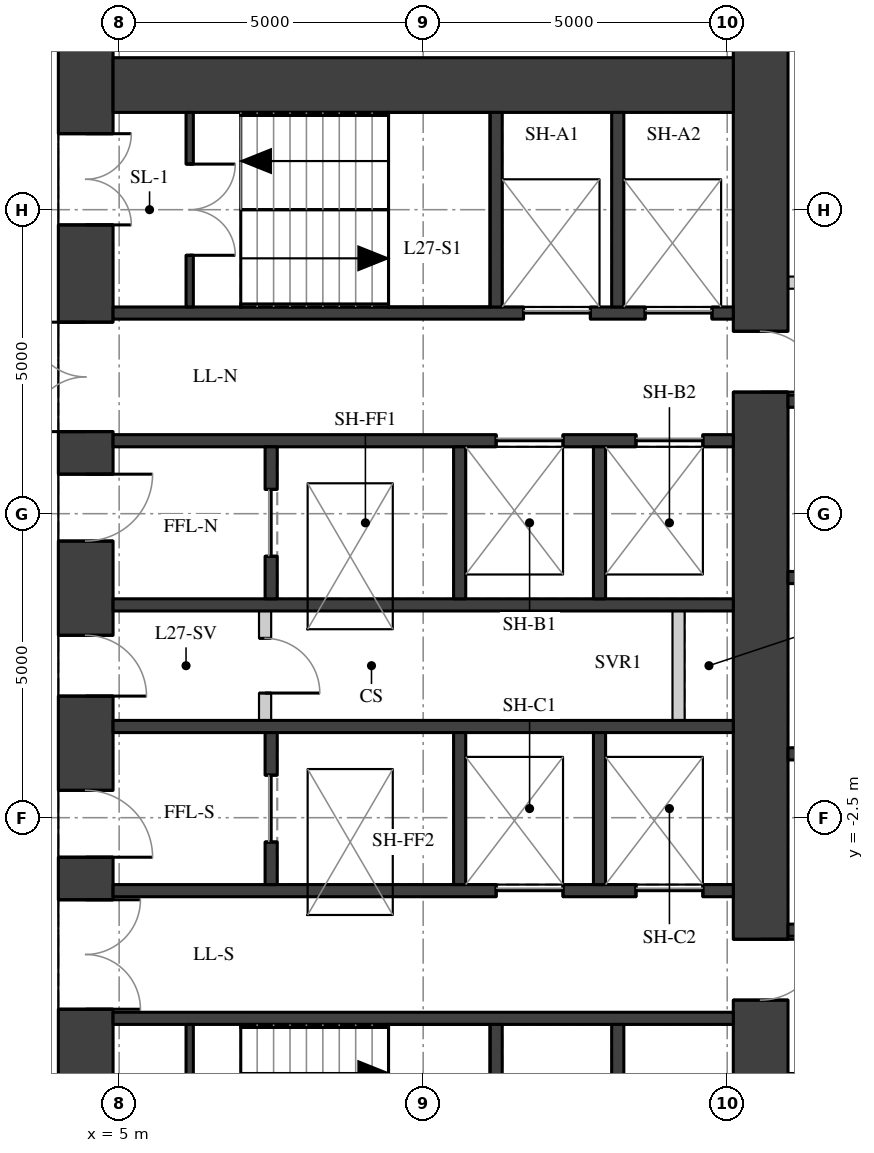
"""IFC4 building model, lengths in metres.
Left out: names, types, materials, properties, quantities, classifications, styles, units other than length and angle.
Written with IfcOpenShell. Run it as: python <this file> out.ifc"""

import sys

from ifc_helpers import new_model, si_unit, direction, frame, frame_2d, origin, place, context, subcontext, project, spatial, rectangle, extrude, element, fill, save


model = new_model("IFC4")
c1 = context("Model", 3, precision=1e-05, world=origin(), true_north=direction((0.0, 1.0)))
c2 = subcontext(c1, "Body", "Model", "MODEL_VIEW")
j1 = project(units=[si_unit("LENGTHUNIT", "METRE"), si_unit("PLANEANGLEUNIT", "RADIAN")], contexts=[c1])
p1 = place(None, origin())
s1 = spatial("IfcSite", under=j1, at=p1, CompositionType="ELEMENT")
p2 = place(p1, origin())
s2 = spatial("IfcBuilding", under=s1, at=p2, CompositionType="ELEMENT")
p3 = place(p2, frame((0.0, 0.0, 98.8)))
s3 = spatial("IfcBuildingStorey", under=s2, at=p3, CompositionType="ELEMENT", Elevation=98.8)
p4 = place(p3, frame((4.45, -11.1, 0.0), z_axis=(0.0, 0.0, 1.0), x_axis=(0.0, 1.0, 0.0)))
e1 = element("IfcWall", 1, at=p4, inside=s3, PredefinedType="SHEAR", context=c2, shape_type="SweptSolid", body=[
    extrude(rectangle(XDim=22.2, YDim=0.9, at=frame_2d((11.1, 0.0))), origin(), (0.0, 0.0, 1.0), 3.02),
])
p5 = place(p4, frame((2.35, 0.0, 0.0)))
e2 = element("IfcOpeningElement", 2, at=p5, cuts=e1, PredefinedType="OPENING", context=c2, shape_type="SweptSolid", body=[
    extrude(rectangle(XDim=1.5, YDim=2.1, at=frame_2d((0.75, 1.05))), frame((0.0, 0.46, 0.0), z_axis=(0.0, -1.0, 0.0), x_axis=(1.0, 0.0, 0.0)), (0.0, 0.0, 1.0), 0.92),
])
p6 = place(p4, frame((5.45, 0.0, 0.0)))
e3 = element("IfcOpeningElement", 3, at=p6, cuts=e1, PredefinedType="OPENING", context=c2, shape_type="SweptSolid", body=[
    extrude(rectangle(XDim=1.8, YDim=2.1, at=frame_2d((0.9, 1.05))), frame((0.0, 0.46, 0.0), z_axis=(0.0, -1.0, 0.0), x_axis=(1.0, 0.0, 0.0)), (0.0, 0.0, 1.0), 0.92),
])
p7 = place(p4, frame((7.95, 0.0, 0.0)))
e4 = element("IfcOpeningElement", 4, at=p7, cuts=e1, PredefinedType="OPENING", context=c2, shape_type="SweptSolid", body=[
    extrude(rectangle(XDim=1.1, YDim=2.1, at=frame_2d((0.55, 1.05))), frame((0.0, 0.46, 0.0), z_axis=(0.0, -1.0, 0.0), x_axis=(1.0, 0.0, 0.0)), (0.0, 0.0, 1.0), 0.92),
])
p8 = place(p4, frame((10.6, 0.0, 0.0)))
e5 = element("IfcOpeningElement", 5, at=p8, cuts=e1, PredefinedType="OPENING", context=c2, shape_type="SweptSolid", body=[
    extrude(rectangle(XDim=1.0, YDim=2.1, at=frame_2d((0.5, 1.05))), frame((0.0, 0.46, 0.0), z_axis=(0.0, -1.0, 0.0), x_axis=(1.0, 0.0, 0.0)), (0.0, 0.0, 1.0), 0.92),
])
p9 = place(p4, frame((13.15, 0.0, 0.0)))
e6 = element("IfcOpeningElement", 6, at=p9, cuts=e1, PredefinedType="OPENING", context=c2, shape_type="SweptSolid", body=[
    extrude(rectangle(XDim=1.1, YDim=2.1, at=frame_2d((0.55, 1.05))), frame((0.0, 0.46, 0.0), z_axis=(0.0, -1.0, 0.0), x_axis=(1.0, 0.0, 0.0)), (0.0, 0.0, 1.0), 0.92),
])
p10 = place(p4, frame((14.95, 0.0, 0.0)))
e7 = element("IfcOpeningElement", 7, at=p10, cuts=e1, PredefinedType="OPENING", context=c2, shape_type="SweptSolid", body=[
    extrude(rectangle(XDim=1.8, YDim=2.1, at=frame_2d((0.9, 1.05))), frame((0.0, 0.46, 0.0), z_axis=(0.0, -1.0, 0.0), x_axis=(1.0, 0.0, 0.0)), (0.0, 0.0, 1.0), 0.92),
])
p11 = place(p4, frame((18.35, 0.0, 0.0)))
e8 = element("IfcOpeningElement", 8, at=p11, cuts=e1, PredefinedType="OPENING", context=c2, shape_type="SweptSolid", body=[
    extrude(rectangle(XDim=1.5, YDim=2.1, at=frame_2d((0.75, 1.05))), frame((0.0, 0.46, 0.0), z_axis=(0.0, -1.0, 0.0), x_axis=(1.0, 0.0, 0.0)), (0.0, 0.0, 1.0), 0.92),
])
p12 = place(p3, frame((15.55, -11.1, 0.0), z_axis=(0.0, 0.0, 1.0), x_axis=(0.0, 1.0, 0.0)))
e9 = element("IfcWall", 9, at=p12, inside=s3, PredefinedType="SHEAR", context=c2, shape_type="SweptSolid", body=[
    extrude(rectangle(XDim=22.2, YDim=0.9, at=frame_2d((11.1, 0.0))), origin(), (0.0, 0.0, 1.0), 3.02),
])
p13 = place(p12, frame((15.6, 0.0, 0.0)))
e10 = element("IfcOpeningElement", 10, at=p13, cuts=e9, PredefinedType="OPENING", context=c2, shape_type="SweptSolid", body=[
    extrude(rectangle(XDim=1.0, YDim=2.1, at=frame_2d((0.5, 1.05))), frame((0.0, 0.46, 0.0), z_axis=(0.0, -1.0, 0.0), x_axis=(1.0, 0.0, 0.0)), (0.0, 0.0, 1.0), 0.92),
])
p14 = place(p12, frame((5.6, 0.0, 0.0)))
e11 = element("IfcOpeningElement", 11, at=p14, cuts=e9, PredefinedType="OPENING", context=c2, shape_type="SweptSolid", body=[
    extrude(rectangle(XDim=1.0, YDim=2.1, at=frame_2d((0.5, 1.05))), frame((0.0, 0.46, 0.0), z_axis=(0.0, -1.0, 0.0), x_axis=(1.0, 0.0, 0.0)), (0.0, 0.0, 1.0), 0.92),
])
p15 = place(p3, frame((4.9, 9.55, 0.0), z_axis=(0.0, 0.0, 1.0), x_axis=(1.0, 0.0, 0.0)))
e12 = element("IfcWall", 12, at=p15, inside=s3, PredefinedType="SHEAR", context=c2, shape_type="SweptSolid", body=[
    extrude(rectangle(XDim=10.2, YDim=0.9, at=frame_2d((5.1, 0.0))), origin(), (0.0, 0.0, 1.0), 3.02),
])
p16 = place(p3, frame((4.9, 5.8, 0.0), z_axis=(0.0, 0.0, 1.0), x_axis=(1.0, 0.0, 0.0)))
e13 = element("IfcWall", 13, at=p16, inside=s3, PredefinedType="SHEAR", context=c2, shape_type="SweptSolid", body=[
    extrude(rectangle(XDim=10.2, YDim=0.2, at=frame_2d((5.1, 0.0))), origin(), (0.0, 0.0, 1.0), 3.02),
])
p17 = place(p16, frame((6.75, 0.0, 0.0)))
e14 = element("IfcOpeningElement", 14, at=p17, cuts=e13, PredefinedType="OPENING", context=c2, shape_type="SweptSolid", body=[
    extrude(rectangle(XDim=1.1, YDim=2.1, at=frame_2d((0.55, 1.05))), frame((0.0, 0.11, 0.0), z_axis=(0.0, -1.0, 0.0), x_axis=(1.0, 0.0, 0.0)), (0.0, 0.0, 1.0), 0.22),
])
p18 = place(p16, frame((8.75, 0.0, 0.0)))
e15 = element("IfcOpeningElement", 15, at=p18, cuts=e13, PredefinedType="OPENING", context=c2, shape_type="SweptSolid", body=[
    extrude(rectangle(XDim=1.1, YDim=2.1, at=frame_2d((0.55, 1.05))), frame((0.0, 0.11, 0.0), z_axis=(0.0, -1.0, 0.0), x_axis=(1.0, 0.0, 0.0)), (0.0, 0.0, 1.0), 0.22),
])
p19 = place(p3, frame((4.9, 3.7, 0.0), z_axis=(0.0, 0.0, 1.0), x_axis=(1.0, 0.0, 0.0)))
e16 = element("IfcWall", 16, at=p19, inside=s3, PredefinedType="SHEAR", context=c2, shape_type="SweptSolid", body=[
    extrude(rectangle(XDim=10.2, YDim=0.2, at=frame_2d((5.1, 0.0))), origin(), (0.0, 0.0, 1.0), 3.02),
])
p20 = place(p19, frame((6.3, 0.0, 0.0)))
e17 = element("IfcOpeningElement", 17, at=p20, cuts=e16, PredefinedType="OPENING", context=c2, shape_type="SweptSolid", body=[
    extrude(rectangle(XDim=1.1, YDim=2.1, at=frame_2d((0.55, 1.05))), frame((0.0, 0.11, 0.0), z_axis=(0.0, -1.0, 0.0), x_axis=(1.0, 0.0, 0.0)), (0.0, 0.0, 1.0), 0.22),
])
p21 = place(p19, frame((8.6, 0.0, 0.0)))
e18 = element("IfcOpeningElement", 18, at=p21, cuts=e16, PredefinedType="OPENING", context=c2, shape_type="SweptSolid", body=[
    extrude(rectangle(XDim=1.1, YDim=2.1, at=frame_2d((0.55, 1.05))), frame((0.0, 0.11, 0.0), z_axis=(0.0, -1.0, 0.0), x_axis=(1.0, 0.0, 0.0)), (0.0, 0.0, 1.0), 0.22),
])
for number, where, z_axis, x_axis in (
    (19, (4.9, 1.0, 0.0), (0.0, 0.0, 1.0), (1.0, 0.0, 0.0)),
    (20, (4.9, -1.0, 0.0), (0.0, 0.0, 1.0), (1.0, 0.0, 0.0)),
):
    element("IfcWall", number, at=place(p3, frame(where, z_axis=z_axis, x_axis=x_axis)), inside=s3, PredefinedType="SHEAR", context=c2, shape_type="SweptSolid", body=[
        extrude(rectangle(XDim=10.2, YDim=0.2, at=frame_2d((5.1, 0.0))), origin(), (0.0, 0.0, 1.0), 3.02),
    ])
p22 = place(p3, frame((4.9, -3.7, 0.0), z_axis=(0.0, 0.0, 1.0), x_axis=(1.0, 0.0, 0.0)))
e21 = element("IfcWall", 21, at=p22, inside=s3, PredefinedType="SHEAR", context=c2, shape_type="SweptSolid", body=[
    extrude(rectangle(XDim=10.2, YDim=0.2, at=frame_2d((5.1, 0.0))), origin(), (0.0, 0.0, 1.0), 3.02),
])
p23 = place(p22, frame((6.3, 0.0, 0.0)))
e22 = element("IfcOpeningElement", 22, at=p23, cuts=e21, PredefinedType="OPENING", context=c2, shape_type="SweptSolid", body=[
    extrude(rectangle(XDim=1.1, YDim=2.1, at=frame_2d((0.55, 1.05))), frame((0.0, 0.11, 0.0), z_axis=(0.0, -1.0, 0.0), x_axis=(1.0, 0.0, 0.0)), (0.0, 0.0, 1.0), 0.22),
])
p24 = place(p22, frame((8.6, 0.0, 0.0)))
e23 = element("IfcOpeningElement", 23, at=p24, cuts=e21, PredefinedType="OPENING", context=c2, shape_type="SweptSolid", body=[
    extrude(rectangle(XDim=1.1, YDim=2.1, at=frame_2d((0.55, 1.05))), frame((0.0, 0.11, 0.0), z_axis=(0.0, -1.0, 0.0), x_axis=(1.0, 0.0, 0.0)), (0.0, 0.0, 1.0), 0.22),
])
p25 = place(p3, frame((4.9, -5.8, 0.0), z_axis=(0.0, 0.0, 1.0), x_axis=(1.0, 0.0, 0.0)))
e24 = element("IfcWall", 24, at=p25, inside=s3, PredefinedType="SHEAR", context=c2, shape_type="SweptSolid", body=[
    extrude(rectangle(XDim=10.2, YDim=0.2, at=frame_2d((5.1, 0.0))), origin(), (0.0, 0.0, 1.0), 3.02),
])
for number, where, z_axis, x_axis in (
    (25, (11.2, 5.9, 0.0), (0.0, 0.0, 1.0), (0.0, 1.0, 0.0)),
    (26, (11.2, -9.1, 0.0), (0.0, 0.0, 1.0), (0.0, 1.0, 0.0)),
    (27, (13.2, 5.9, 0.0), (0.0, 0.0, 1.0), (0.0, 1.0, 0.0)),
    (28, (13.2, -9.1, 0.0), (0.0, 0.0, 1.0), (0.0, 1.0, 0.0)),
):
    element("IfcWall", number, at=place(p3, frame(where, z_axis=z_axis, x_axis=x_axis)), inside=s3, PredefinedType="SHEAR", context=c2, shape_type="SweptSolid", body=[
        extrude(rectangle(XDim=3.2, YDim=0.2, at=frame_2d((1.6, 0.0))), origin(), (0.0, 0.0, 1.0), 3.02),
    ])
p26 = place(p3, frame((7.5, 1.1, 0.0), z_axis=(0.0, 0.0, 1.0), x_axis=(0.0, 1.0, 0.0)))
e29 = element("IfcWall", 29, at=p26, inside=s3, PredefinedType="SHEAR", context=c2, shape_type="SweptSolid", body=[
    extrude(rectangle(XDim=2.5, YDim=0.2, at=frame_2d((1.25, 0.0))), origin(), (0.0, 0.0, 1.0), 3.02),
])
p27 = place(p26, frame((0.7, 0.0, 0.0)))
e30 = element("IfcOpeningElement", 30, at=p27, cuts=e29, PredefinedType="OPENING", context=c2, shape_type="SweptSolid", body=[
    extrude(rectangle(XDim=1.1, YDim=2.1, at=frame_2d((0.55, 1.05))), frame((0.0, 0.11, 0.0), z_axis=(0.0, -1.0, 0.0), x_axis=(1.0, 0.0, 0.0)), (0.0, 0.0, 1.0), 0.22),
])
p28 = place(p3, frame((7.5, -3.6, 0.0), z_axis=(0.0, 0.0, 1.0), x_axis=(0.0, 1.0, 0.0)))
e31 = element("IfcWall", 31, at=p28, inside=s3, PredefinedType="SHEAR", context=c2, shape_type="SweptSolid", body=[
    extrude(rectangle(XDim=2.5, YDim=0.2, at=frame_2d((1.25, 0.0))), origin(), (0.0, 0.0, 1.0), 3.02),
])
p29 = place(p28, frame((0.7, 0.0, 0.0)))
e32 = element("IfcOpeningElement", 32, at=p29, cuts=e31, PredefinedType="OPENING", context=c2, shape_type="SweptSolid", body=[
    extrude(rectangle(XDim=1.1, YDim=2.1, at=frame_2d((0.55, 1.05))), frame((0.0, 0.11, 0.0), z_axis=(0.0, -1.0, 0.0), x_axis=(1.0, 0.0, 0.0)), (0.0, 0.0, 1.0), 0.22),
])
for number, where, z_axis, x_axis in (
    (33, (10.6, 1.1, 0.0), (0.0, 0.0, 1.0), (0.0, 1.0, 0.0)),
    (34, (10.6, -3.6, 0.0), (0.0, 0.0, 1.0), (0.0, 1.0, 0.0)),
    (35, (12.9, 1.1, 0.0), (0.0, 0.0, 1.0), (0.0, 1.0, 0.0)),
    (36, (12.9, -3.6, 0.0), (0.0, 0.0, 1.0), (0.0, 1.0, 0.0)),
):
    element("IfcWall", number, at=place(p3, frame(where, z_axis=z_axis, x_axis=x_axis)), inside=s3, PredefinedType="SHEAR", context=c2, shape_type="SweptSolid", body=[
        extrude(rectangle(XDim=2.5, YDim=0.2, at=frame_2d((1.25, 0.0))), origin(), (0.0, 0.0, 1.0), 3.02),
    ])
p30 = place(p3, frame((6.16, 5.9, 0.0), z_axis=(0.0, 0.0, 1.0), x_axis=(0.0, 1.0, 0.0)))
e37 = element("IfcWall", 37, at=p30, inside=s3, PredefinedType="SHEAR", context=c2, shape_type="SweptSolid", body=[
    extrude(rectangle(XDim=3.2, YDim=0.12, at=frame_2d((1.6, 0.0))), origin(), (0.0, 0.0, 1.0), 3.02),
])
p31 = place(p30, frame((0.85, 0.0, 0.0)))
e38 = element("IfcOpeningElement", 38, at=p31, cuts=e37, PredefinedType="OPENING", context=c2, shape_type="SweptSolid", body=[
    extrude(rectangle(XDim=1.5, YDim=2.1, at=frame_2d((0.75, 1.05))), frame((0.0, 0.07, 0.0), z_axis=(0.0, -1.0, 0.0), x_axis=(1.0, 0.0, 0.0)), (0.0, 0.0, 1.0), 0.14),
])
p32 = place(p3, frame((6.16, -9.1, 0.0), z_axis=(0.0, 0.0, 1.0), x_axis=(0.0, 1.0, 0.0)))
e39 = element("IfcWall", 39, at=p32, inside=s3, PredefinedType="SHEAR", context=c2, shape_type="SweptSolid", body=[
    extrude(rectangle(XDim=3.2, YDim=0.12, at=frame_2d((1.6, 0.0))), origin(), (0.0, 0.0, 1.0), 3.02),
])
p33 = place(p32, frame((0.85, 0.0, 0.0)))
e40 = element("IfcOpeningElement", 40, at=p33, cuts=e39, PredefinedType="OPENING", context=c2, shape_type="SweptSolid", body=[
    extrude(rectangle(XDim=1.5, YDim=2.1, at=frame_2d((0.75, 1.05))), frame((0.0, 0.07, 0.0), z_axis=(0.0, -1.0, 0.0), x_axis=(1.0, 0.0, 0.0)), (0.0, 0.0, 1.0), 0.14),
])
p34 = place(p3, frame((7.4, -0.9, 0.0), z_axis=(0.0, 0.0, 1.0), x_axis=(0.0, 1.0, 0.0)))
e41 = element("IfcWall", 41, at=p34, inside=s3, PredefinedType="PARTITIONING", context=c2, shape_type="SweptSolid", body=[
    extrude(rectangle(XDim=1.8, YDim=0.2, at=frame_2d((0.9, 0.0))), origin(), (0.0, 0.0, 1.0), 3.02),
])
p35 = place(p34, frame((0.45, 0.0, 0.0)))
e42 = element("IfcOpeningElement", 42, at=p35, cuts=e41, PredefinedType="OPENING", context=c2, shape_type="SweptSolid", body=[
    extrude(rectangle(XDim=0.9, YDim=2.1, at=frame_2d((0.45, 1.05))), frame((0.0, 0.11, 0.0), z_axis=(0.0, -1.0, 0.0), x_axis=(1.0, 0.0, 0.0)), (0.0, 0.0, 1.0), 0.22),
])
p36 = place(p3, frame((14.2, -0.9, 0.0), z_axis=(0.0, 0.0, 1.0), x_axis=(0.0, 1.0, 0.0)))
e43 = element("IfcWall", 43, at=p36, inside=s3, PredefinedType="PARTITIONING", context=c2, shape_type="SweptSolid", body=[
    extrude(rectangle(XDim=1.8, YDim=0.2, at=frame_2d((0.9, 0.0))), origin(), (0.0, 0.0, 1.0), 3.02),
])
for number, where, z_axis, x_axis in (
    (44, (16.0, -4.35, 0.0), (0.0, 0.0, 1.0), (1.0, 0.0, 0.0)),
    (45, (16.0, -1.45, 0.0), (0.0, 0.0, 1.0), (1.0, 0.0, 0.0)),
    (46, (16.0, 1.45, 0.0), (0.0, 0.0, 1.0), (1.0, 0.0, 0.0)),
    (47, (16.0, 4.35, 0.0), (0.0, 0.0, 1.0), (1.0, 0.0, 0.0)),
):
    element("IfcWall", number, at=place(p3, frame(where, z_axis=z_axis, x_axis=x_axis)), inside=s3, PredefinedType="SHEAR", context=c2, shape_type="SweptSolid", body=[
        extrude(rectangle(XDim=2.3, YDim=0.2, at=frame_2d((1.15, 0.0))), origin(), (0.0, 0.0, 1.0), 3.02),
    ])
p37 = place(p3, frame((16.0, 6.3, 0.0), z_axis=(0.0, 0.0, 1.0), x_axis=(1.0, 0.0, 0.0)))
e48 = element("IfcWall", 48, at=p37, inside=s3, PredefinedType="PARTITIONING", context=c2, shape_type="SweptSolid", body=[
    extrude(rectangle(XDim=2.3, YDim=0.2, at=frame_2d((1.15, 0.0))), origin(), (0.0, 0.0, 1.0), 3.02),
])
p38 = place(p37, frame((0.3, 0.0, 0.0)))
e49 = element("IfcOpeningElement", 49, at=p38, cuts=e48, PredefinedType="OPENING", context=c2, shape_type="SweptSolid", body=[
    extrude(rectangle(XDim=0.9, YDim=2.1, at=frame_2d((0.45, 1.05))), frame((0.0, 0.11, 0.0), z_axis=(0.0, -1.0, 0.0), x_axis=(1.0, 0.0, 0.0)), (0.0, 0.0, 1.0), 0.22),
])
p39 = place(p6, origin())
e50 = element("IfcDoor", 50, at=p39, inside=s3, OperationType="DOUBLE_DOOR_SINGLE_SWING", PredefinedType="DOOR", context=c2, shape_type="SweptSolid", body=[
    extrude(rectangle(XDim=1.8, YDim=2.1, at=frame_2d((0.9, 1.05))), frame((0.0, 0.025, 0.0), z_axis=(0.0, -1.0, 0.0), x_axis=(1.0, 0.0, 0.0)), (0.0, 0.0, 1.0), 0.05),
])
fill(e3, e50)
p40 = place(p7, origin())
e51 = element("IfcDoor", 51, at=p40, inside=s3, OperationType="SINGLE_SWING_RIGHT", PredefinedType="DOOR", context=c2, shape_type="SweptSolid", body=[
    extrude(rectangle(XDim=1.1, YDim=2.1, at=frame_2d((0.55, 1.05))), frame((0.0, 0.025, 0.0), z_axis=(0.0, -1.0, 0.0), x_axis=(1.0, 0.0, 0.0)), (0.0, 0.0, 1.0), 0.05),
])
fill(e4, e51)
p41 = place(p8, origin())
e52 = element("IfcDoor", 52, at=p41, inside=s3, OperationType="SINGLE_SWING_RIGHT", PredefinedType="DOOR", context=c2, shape_type="SweptSolid", body=[
    extrude(rectangle(XDim=1.0, YDim=2.1, at=frame_2d((0.5, 1.05))), frame((0.0, 0.025, 0.0), z_axis=(0.0, -1.0, 0.0), x_axis=(1.0, 0.0, 0.0)), (0.0, 0.0, 1.0), 0.05),
])
fill(e5, e52)
p42 = place(p9, origin())
e53 = element("IfcDoor", 53, at=p42, inside=s3, OperationType="SINGLE_SWING_LEFT", PredefinedType="DOOR", context=c2, shape_type="SweptSolid", body=[
    extrude(rectangle(XDim=1.1, YDim=2.1, at=frame_2d((0.55, 1.05))), frame((0.0, 0.025, 0.0), z_axis=(0.0, -1.0, 0.0), x_axis=(1.0, 0.0, 0.0)), (0.0, 0.0, 1.0), 0.05),
])
fill(e6, e53)
p43 = place(p10, origin())
e54 = element("IfcDoor", 54, at=p43, inside=s3, OperationType="DOUBLE_DOOR_SINGLE_SWING", PredefinedType="DOOR", context=c2, shape_type="SweptSolid", body=[
    extrude(rectangle(XDim=1.8, YDim=2.1, at=frame_2d((0.9, 1.05))), frame((0.0, 0.025, 0.0), z_axis=(0.0, -1.0, 0.0), x_axis=(1.0, 0.0, 0.0)), (0.0, 0.0, 1.0), 0.05),
])
fill(e7, e54)
p44 = place(p11, origin())
e55 = element("IfcDoor", 55, at=p44, inside=s3, OperationType="DOUBLE_DOOR_SINGLE_SWING", PredefinedType="DOOR", context=c2, shape_type="SweptSolid", body=[
    extrude(rectangle(XDim=1.5, YDim=2.1, at=frame_2d((0.75, 1.05))), frame((0.0, 0.025, 0.0), z_axis=(0.0, -1.0, 0.0), x_axis=(1.0, 0.0, 0.0)), (0.0, 0.0, 1.0), 0.05),
])
fill(e8, e55)
p45 = place(p31, origin())
e56 = element("IfcDoor", 56, at=p45, inside=s3, OperationType="DOUBLE_DOOR_SINGLE_SWING", PredefinedType="DOOR", context=c2, shape_type="SweptSolid", body=[
    extrude(rectangle(XDim=1.5, YDim=2.1, at=frame_2d((0.75, 1.05))), frame((0.0, 0.025, 0.0), z_axis=(0.0, -1.0, 0.0), x_axis=(1.0, 0.0, 0.0)), (0.0, 0.0, 1.0), 0.05),
])
fill(e38, e56)
p46 = place(p17, origin())
e57 = element("IfcDoor", 57, at=p46, inside=s3, OperationType="DOUBLE_DOOR_SLIDING", PredefinedType="DOOR", context=c2, shape_type="SweptSolid", body=[
    extrude(rectangle(XDim=1.1, YDim=2.1, at=frame_2d((0.55, 1.05))), frame((0.0, 0.025, 0.0), z_axis=(0.0, -1.0, 0.0), x_axis=(1.0, 0.0, 0.0)), (0.0, 0.0, 1.0), 0.05),
])
fill(e14, e57)
p47 = place(p18, origin())
e58 = element("IfcDoor", 58, at=p47, inside=s3, OperationType="DOUBLE_DOOR_SLIDING", PredefinedType="DOOR", context=c2, shape_type="SweptSolid", body=[
    extrude(rectangle(XDim=1.1, YDim=2.1, at=frame_2d((0.55, 1.05))), frame((0.0, 0.025, 0.0), z_axis=(0.0, -1.0, 0.0), x_axis=(1.0, 0.0, 0.0)), (0.0, 0.0, 1.0), 0.05),
])
fill(e15, e58)
p48 = place(p20, origin())
e59 = element("IfcDoor", 59, at=p48, inside=s3, OperationType="DOUBLE_DOOR_SLIDING", PredefinedType="DOOR", context=c2, shape_type="SweptSolid", body=[
    extrude(rectangle(XDim=1.1, YDim=2.1, at=frame_2d((0.55, 1.05))), frame((0.0, 0.025, 0.0), z_axis=(0.0, -1.0, 0.0), x_axis=(1.0, 0.0, 0.0)), (0.0, 0.0, 1.0), 0.05),
])
fill(e17, e59)
p49 = place(p21, origin())
e60 = element("IfcDoor", 60, at=p49, inside=s3, OperationType="DOUBLE_DOOR_SLIDING", PredefinedType="DOOR", context=c2, shape_type="SweptSolid", body=[
    extrude(rectangle(XDim=1.1, YDim=2.1, at=frame_2d((0.55, 1.05))), frame((0.0, 0.025, 0.0), z_axis=(0.0, -1.0, 0.0), x_axis=(1.0, 0.0, 0.0)), (0.0, 0.0, 1.0), 0.05),
])
fill(e18, e60)
p50 = place(p23, origin())
e61 = element("IfcDoor", 61, at=p50, inside=s3, OperationType="DOUBLE_DOOR_SLIDING", PredefinedType="DOOR", context=c2, shape_type="SweptSolid", body=[
    extrude(rectangle(XDim=1.1, YDim=2.1, at=frame_2d((0.55, 1.05))), frame((0.0, 0.025, 0.0), z_axis=(0.0, -1.0, 0.0), x_axis=(1.0, 0.0, 0.0)), (0.0, 0.0, 1.0), 0.05),
])
fill(e22, e61)
p51 = place(p24, origin())
e62 = element("IfcDoor", 62, at=p51, inside=s3, OperationType="DOUBLE_DOOR_SLIDING", PredefinedType="DOOR", context=c2, shape_type="SweptSolid", body=[
    extrude(rectangle(XDim=1.1, YDim=2.1, at=frame_2d((0.55, 1.05))), frame((0.0, 0.025, 0.0), z_axis=(0.0, -1.0, 0.0), x_axis=(1.0, 0.0, 0.0)), (0.0, 0.0, 1.0), 0.05),
])
fill(e23, e62)
p52 = place(p27, origin())
e63 = element("IfcDoor", 63, at=p52, inside=s3, OperationType="DOUBLE_DOOR_SLIDING", PredefinedType="DOOR", context=c2, shape_type="SweptSolid", body=[
    extrude(rectangle(XDim=1.1, YDim=2.1, at=frame_2d((0.55, 1.05))), frame((0.0, 0.025, 0.0), z_axis=(0.0, -1.0, 0.0), x_axis=(1.0, 0.0, 0.0)), (0.0, 0.0, 1.0), 0.05),
])
fill(e30, e63)
p53 = place(p29, origin())
e64 = element("IfcDoor", 64, at=p53, inside=s3, OperationType="DOUBLE_DOOR_SLIDING", PredefinedType="DOOR", context=c2, shape_type="SweptSolid", body=[
    extrude(rectangle(XDim=1.1, YDim=2.1, at=frame_2d((0.55, 1.05))), frame((0.0, 0.025, 0.0), z_axis=(0.0, -1.0, 0.0), x_axis=(1.0, 0.0, 0.0)), (0.0, 0.0, 1.0), 0.05),
])
fill(e32, e64)
p54 = place(p35, origin())
e65 = element("IfcDoor", 65, at=p54, inside=s3, OperationType="SINGLE_SWING_RIGHT", PredefinedType="DOOR", context=c2, shape_type="SweptSolid", body=[
    extrude(rectangle(XDim=0.9, YDim=2.1, at=frame_2d((0.45, 1.05))), frame((0.0, 0.025, 0.0), z_axis=(0.0, -1.0, 0.0), x_axis=(1.0, 0.0, 0.0)), (0.0, 0.0, 1.0), 0.05),
])
fill(e42, e65)
p55 = place(p13, origin())
e66 = element("IfcDoor", 66, at=p55, inside=s3, OperationType="SINGLE_SWING_RIGHT", PredefinedType="DOOR", context=c2, shape_type="SweptSolid", body=[
    extrude(rectangle(XDim=1.0, YDim=2.1, at=frame_2d((0.5, 1.05))), frame((0.0, 0.025, 0.0), z_axis=(0.0, -1.0, 0.0), x_axis=(1.0, 0.0, 0.0)), (0.0, 0.0, 1.0), 0.05),
])
fill(e10, e66)
p56 = place(p14, origin())
e67 = element("IfcDoor", 67, at=p56, inside=s3, OperationType="SINGLE_SWING_LEFT", PredefinedType="DOOR", context=c2, shape_type="SweptSolid", body=[
    extrude(rectangle(XDim=1.0, YDim=2.1, at=frame_2d((0.5, 1.05))), frame((0.0, 0.025, 0.0), z_axis=(0.0, -1.0, 0.0), x_axis=(1.0, 0.0, 0.0)), (0.0, 0.0, 1.0), 0.05),
])
fill(e11, e67)
save(model, sys.argv[1])
